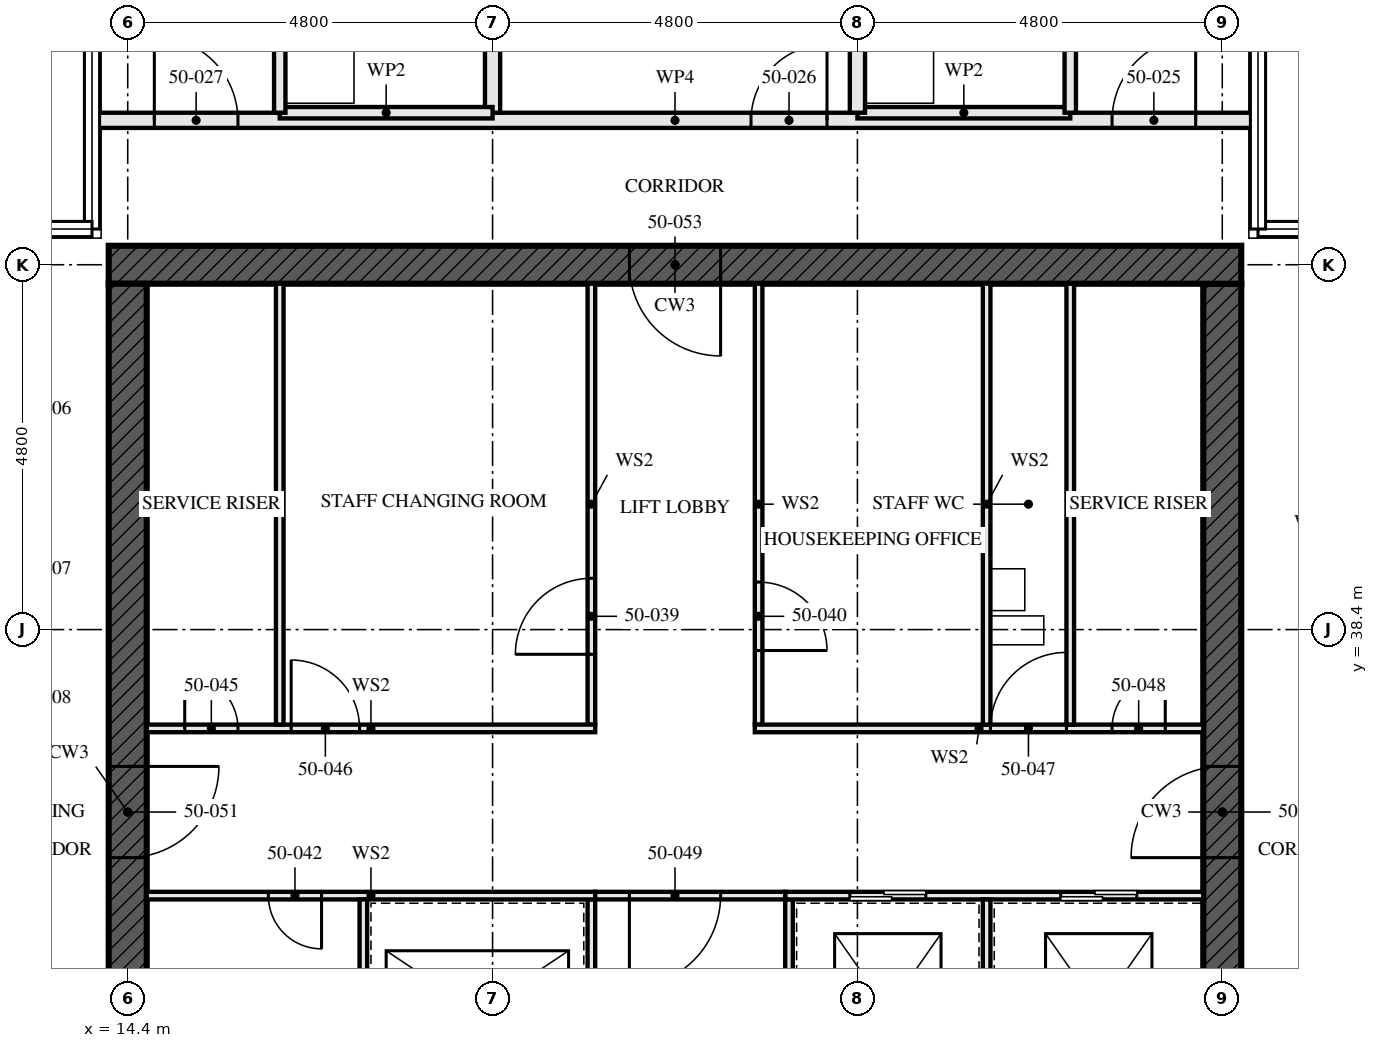
"""IFC4 building model, lengths in metres.
Left out: names, types, materials, properties, quantities, classifications, styles, units other than length and angle.
Written with IfcOpenShell. Run it as: python <this file> out.ifc"""

import sys

from ifc_helpers import new_model, si_unit, direction, frame, frame_2d, origin, place, context, subcontext, project, spatial, rectangle, extrude, element, fill, save


model = new_model("IFC4")
c1 = context("Model", 3, precision=1e-05, world=origin(), true_north=direction((0.0, 1.0)))
c2 = subcontext(c1, "Body", "Model", "MODEL_VIEW")
j1 = project(units=[si_unit("LENGTHUNIT", "METRE"), si_unit("PLANEANGLEUNIT", "RADIAN")], contexts=[c1])
p1 = place(None, origin())
s1 = spatial("IfcSite", under=j1, at=p1, CompositionType="ELEMENT")
p2 = place(p1, origin())
s2 = spatial("IfcBuilding", under=s1, at=p2, CompositionType="ELEMENT")
p3 = place(p2, frame((0.0, 0.0, 183.0)))
s3 = spatial("IfcBuildingStorey", under=s2, at=p3, CompositionType="ELEMENT", Elevation=183.0)
p4 = place(p3, frame((29.05, 43.2, -0.17), z_axis=(0.0, 0.0, 1.0), x_axis=(-1.0, 0.0, 0.0)))
e1 = element("IfcWall", 1, at=p4, inside=s3, PredefinedType="SHEAR", context=c2, shape_type="SweptSolid", body=[
    extrude(rectangle(XDim=14.9, YDim=0.5, at=frame_2d((7.45, 0.0))), origin(), (0.0, 0.0, 1.0), 3.5),
])
p5 = place(p4, frame((6.85, 0.0, 0.17)))
e2 = element("IfcOpeningElement", 2, at=p5, cuts=e1, PredefinedType="OPENING", context=c2, shape_type="SweptSolid", body=[
    extrude(rectangle(XDim=1.2, YDim=2.1, at=frame_2d((0.6, 1.05))), frame((0.0, 0.26, 0.0), z_axis=(0.0, -1.0, 0.0), x_axis=(1.0, 0.0, 0.0)), (0.0, 0.0, 1.0), 0.521),
])
p6 = place(p3, frame((14.4, 42.95, -0.17), z_axis=(0.0, 0.0, 1.0), x_axis=(0.0, -1.0, 0.0)))
e3 = element("IfcWall", 3, at=p6, inside=s3, PredefinedType="SHEAR", context=c2, shape_type="SweptSolid", body=[
    extrude(rectangle(XDim=13.9, YDim=0.5, at=frame_2d((6.95, 0.0))), origin(), (0.0, 0.0, 1.0), 3.5),
])
p7 = place(p6, frame((6.35, 0.0, 0.17)))
e4 = element("IfcOpeningElement", 4, at=p7, cuts=e3, PredefinedType="OPENING", context=c2, shape_type="SweptSolid", body=[
    extrude(rectangle(XDim=1.2, YDim=2.1, at=frame_2d((0.6, 1.05))), frame((0.0, 0.26, 0.0), z_axis=(0.0, -1.0, 0.0), x_axis=(1.0, 0.0, 0.0)), (0.0, 0.0, 1.0), 0.521),
])
p8 = place(p3, frame((28.8, 29.05, -0.17), z_axis=(0.0, 0.0, 1.0), x_axis=(0.0, 1.0, 0.0)))
e5 = element("IfcWall", 5, at=p8, inside=s3, PredefinedType="SHEAR", context=c2, shape_type="SweptSolid", body=[
    extrude(rectangle(XDim=13.9, YDim=0.5, at=frame_2d((6.95, 0.0))), origin(), (0.0, 0.0, 1.0), 3.5),
])
p9 = place(p8, frame((6.35, 0.0, 0.17)))
e6 = element("IfcOpeningElement", 6, at=p9, cuts=e5, PredefinedType="OPENING", context=c2, shape_type="SweptSolid", body=[
    extrude(rectangle(XDim=1.2, YDim=2.1, at=frame_2d((0.6, 1.05))), frame((0.0, 0.26, 0.0), z_axis=(0.0, -1.0, 0.0), x_axis=(1.0, 0.0, 0.0)), (0.0, 0.0, 1.0), 0.521),
])
p10 = place(p3, frame((26.8, 48.2, 0.0), z_axis=(0.0, 0.0, 1.0), x_axis=(0.0, -1.0, 0.0)))
e7 = element("IfcWall", 7, at=p10, inside=s3, PredefinedType="PARTITIONING", context=c2, shape_type="SweptSolid", body=[
    extrude(rectangle(XDim=3.0, YDim=0.15, at=frame_2d((1.5, 0.0))), origin(), (0.0, 0.0, 1.0), 2.55),
])
p11 = place(p3, frame((26.8, 45.2, 0.0), z_axis=(0.0, 0.0, 1.0), x_axis=(-1.0, 0.0, 0.0)))
e8 = element("IfcWall", 8, at=p11, inside=s3, PredefinedType="PARTITIONING", context=c2, shape_type="SweptSolid", body=[
    extrude(rectangle(XDim=2.8, YDim=0.15, at=frame_2d((1.4, 0.0))), origin(), (0.0, 0.0, 1.0), 3.33),
])
for number, where, z_axis, x_axis in (
    (9, (24.0, 52.48, 0.0), (0.0, 0.0, 1.0), (0.0, -1.0, 0.0)),
    (10, (19.2, 52.48, 0.0), (0.0, 0.0, 1.0), (0.0, -1.0, 0.0)),
):
    element("IfcWall", number, at=place(p3, frame(where, z_axis=z_axis, x_axis=x_axis)), inside=s3, PredefinedType="PARTITIONING", context=c2, shape_type="SweptSolid", body=[
        extrude(rectangle(XDim=7.28, YDim=0.2, at=frame_2d((3.64, 0.0))), origin(), (0.0, 0.0, 1.0), 2.55),
    ])
p12 = place(p3, frame((16.4, 48.2, 0.0), z_axis=(0.0, 0.0, 1.0), x_axis=(0.0, -1.0, 0.0)))
e11 = element("IfcWall", 11, at=p12, inside=s3, PredefinedType="PARTITIONING", context=c2, shape_type="SweptSolid", body=[
    extrude(rectangle(XDim=3.0, YDim=0.15, at=frame_2d((1.5, 0.0))), origin(), (0.0, 0.0, 1.0), 2.55),
])
p13 = place(p3, frame((19.2, 45.2, 0.0), z_axis=(0.0, 0.0, 1.0), x_axis=(-1.0, 0.0, 0.0)))
e12 = element("IfcWall", 12, at=p13, inside=s3, PredefinedType="PARTITIONING", context=c2, shape_type="SweptSolid", body=[
    extrude(rectangle(XDim=2.8, YDim=0.15, at=frame_2d((1.4, 0.0))), origin(), (0.0, 0.0, 1.0), 3.33),
])
p14 = place(p3, frame((29.25, 45.1, 0.0), z_axis=(0.0, 0.0, 1.0), x_axis=(-1.0, 0.0, 0.0)))
e13 = element("IfcWall", 13, at=p14, inside=s3, PredefinedType="PARTITIONING", context=c2, shape_type="SweptSolid", body=[
    extrude(rectangle(XDim=15.3, YDim=0.2, at=frame_2d((7.65, 0.0))), origin(), (0.0, 0.0, 1.0), 2.32),
])
p15 = place(p14, frame((0.8, 0.0, 0.0)))
e14 = element("IfcOpeningElement", 14, at=p15, cuts=e13, PredefinedType="OPENING", context=c2, shape_type="SweptSolid", body=[
    extrude(rectangle(XDim=1.1, YDim=2.1, at=frame_2d((0.55, 1.05))), frame((0.0, 0.111, 0.0), z_axis=(0.0, -1.0, 0.0), x_axis=(1.0, 0.0, 0.0)), (0.0, 0.0, 1.0), 0.221),
])
p16 = place(p14, frame((5.65, 0.0, 0.0)))
e15 = element("IfcOpeningElement", 15, at=p16, cuts=e13, PredefinedType="OPENING", context=c2, shape_type="SweptSolid", body=[
    extrude(rectangle(XDim=1.0, YDim=2.1, at=frame_2d((0.5, 1.05))), frame((0.0, 0.111, 0.0), z_axis=(0.0, -1.0, 0.0), x_axis=(1.0, 0.0, 0.0)), (0.0, 0.0, 1.0), 0.221),
])
p17 = place(p14, frame((13.4, 0.0, 0.0)))
e16 = element("IfcOpeningElement", 16, at=p17, cuts=e13, PredefinedType="OPENING", context=c2, shape_type="SweptSolid", body=[
    extrude(rectangle(XDim=1.1, YDim=2.1, at=frame_2d((0.55, 1.05))), frame((0.0, 0.111, 0.0), z_axis=(0.0, -1.0, 0.0), x_axis=(1.0, 0.0, 0.0)), (0.0, 0.0, 1.0), 0.221),
])
for number, where, z_axis, x_axis in (
    (17, (16.4, 37.15, 0.0), (0.0, 0.0, 1.0), (0.0, 1.0, 0.0)),
    (18, (26.8, 37.15, 0.0), (0.0, 0.0, 1.0), (0.0, 1.0, 0.0)),
):
    element("IfcWall", number, at=place(p3, frame(where, z_axis=z_axis, x_axis=x_axis)), inside=s3, PredefinedType="SOLIDWALL", context=c2, shape_type="SweptSolid", body=[
        extrude(rectangle(XDim=5.8, YDim=0.1, at=frame_2d((2.9, 0.0))), origin(), (0.0, 0.0, 1.0), 3.33),
    ])
p18 = place(p3, frame((20.5, 29.05, 0.0), z_axis=(0.0, 0.0, 1.0), x_axis=(0.0, 1.0, 0.0)))
e19 = element("IfcWall", 19, at=p18, inside=s3, PredefinedType="SOLIDWALL", context=c2, shape_type="SweptSolid", body=[
    extrude(rectangle(XDim=5.8, YDim=0.1, at=frame_2d((2.9, 0.0))), origin(), (0.0, 0.0, 1.0), 3.33),
])
p19 = place(p18, frame((0.8, 0.0, 0.0)))
e20 = element("IfcOpeningElement", 20, at=p19, cuts=e19, PredefinedType="OPENING", context=c2, shape_type="SweptSolid", body=[
    extrude(rectangle(XDim=1.1, YDim=2.3, at=frame_2d((0.55, 1.15))), frame((0.0, 0.061, 0.0), z_axis=(0.0, -1.0, 0.0), x_axis=(1.0, 0.0, 0.0)), (0.0, 0.0, 1.0), 0.121),
])
p20 = place(p18, frame((3.775, 0.0, 0.0)))
e21 = element("IfcOpeningElement", 21, at=p20, cuts=e19, PredefinedType="OPENING", context=c2, shape_type="SweptSolid", body=[
    extrude(rectangle(XDim=1.1, YDim=2.3, at=frame_2d((0.55, 1.15))), frame((0.0, 0.061, 0.0), z_axis=(0.0, -1.0, 0.0), x_axis=(1.0, 0.0, 0.0)), (0.0, 0.0, 1.0), 0.121),
])
p21 = place(p3, frame((20.5, 37.15, 0.0), z_axis=(0.0, 0.0, 1.0), x_axis=(0.0, 1.0, 0.0)))
e22 = element("IfcWall", 22, at=p21, inside=s3, PredefinedType="SOLIDWALL", context=c2, shape_type="SweptSolid", body=[
    extrude(rectangle(XDim=5.8, YDim=0.1, at=frame_2d((2.9, 0.0))), origin(), (0.0, 0.0, 1.0), 3.33),
])
p22 = place(p21, frame((0.925, 0.0, 0.0)))
e23 = element("IfcOpeningElement", 23, at=p22, cuts=e22, PredefinedType="OPENING", context=c2, shape_type="SweptSolid", body=[
    extrude(rectangle(XDim=1.0, YDim=2.1, at=frame_2d((0.5, 1.05))), frame((0.0, 0.061, 0.0), z_axis=(0.0, -1.0, 0.0), x_axis=(1.0, 0.0, 0.0)), (0.0, 0.0, 1.0), 0.121),
])
p23 = place(p3, frame((22.7, 37.15, 0.0), z_axis=(0.0, 0.0, 1.0), x_axis=(0.0, 1.0, 0.0)))
e24 = element("IfcWall", 24, at=p23, inside=s3, PredefinedType="SOLIDWALL", context=c2, shape_type="SweptSolid", body=[
    extrude(rectangle(XDim=5.8, YDim=0.1, at=frame_2d((2.9, 0.0))), origin(), (0.0, 0.0, 1.0), 3.33),
])
p24 = place(p23, frame((0.975, 0.0, 0.0)))
e25 = element("IfcOpeningElement", 25, at=p24, cuts=e24, PredefinedType="OPENING", context=c2, shape_type="SweptSolid", body=[
    extrude(rectangle(XDim=0.9, YDim=2.1, at=frame_2d((0.45, 1.05))), frame((0.0, 0.061, 0.0), z_axis=(0.0, -1.0, 0.0), x_axis=(1.0, 0.0, 0.0)), (0.0, 0.0, 1.0), 0.121),
])
p25 = place(p3, frame((23.1, 29.05, 0.0), z_axis=(0.0, 0.0, 1.0), x_axis=(0.0, 1.0, 0.0)))
e26 = element("IfcWall", 26, at=p25, inside=s3, PredefinedType="SOLIDWALL", context=c2, shape_type="SweptSolid", body=[
    extrude(rectangle(XDim=5.8, YDim=0.1, at=frame_2d((2.9, 0.0))), origin(), (0.0, 0.0, 1.0), 3.33),
])
p26 = place(p25, frame((1.0, 0.0, 0.0)))
e27 = element("IfcOpeningElement", 27, at=p26, cuts=e26, PredefinedType="OPENING", context=c2, shape_type="SweptSolid", body=[
    extrude(rectangle(XDim=0.7, YDim=2.1, at=frame_2d((0.35, 1.05))), frame((0.0, 0.061, 0.0), z_axis=(0.0, -1.0, 0.0), x_axis=(1.0, 0.0, 0.0)), (0.0, 0.0, 1.0), 0.121),
])
p27 = place(p3, frame((14.65, 34.9, 0.0), z_axis=(0.0, 0.0, 1.0), x_axis=(1.0, 0.0, 0.0)))
e28 = element("IfcWall", 28, at=p27, inside=s3, PredefinedType="SOLIDWALL", context=c2, shape_type="SweptSolid", body=[
    extrude(rectangle(XDim=5.9, YDim=0.1, at=frame_2d((2.95, 0.0))), origin(), (0.0, 0.0, 1.0), 3.33),
])
p28 = place(p27, frame((1.6, 0.0, 0.0)))
e29 = element("IfcOpeningElement", 29, at=p28, cuts=e28, PredefinedType="OPENING", context=c2, shape_type="SweptSolid", body=[
    extrude(rectangle(XDim=0.7, YDim=2.1, at=frame_2d((0.35, 1.05))), frame((0.0, 0.061, 0.0), z_axis=(0.0, -1.0, 0.0), x_axis=(1.0, 0.0, 0.0)), (0.0, 0.0, 1.0), 0.121),
])
p29 = place(p3, frame((23.05, 34.9, 0.0), z_axis=(0.0, 0.0, 1.0), x_axis=(1.0, 0.0, 0.0)))
e30 = element("IfcWall", 30, at=p29, inside=s3, PredefinedType="SOLIDWALL", context=c2, shape_type="SweptSolid", body=[
    extrude(rectangle(XDim=5.5, YDim=0.1, at=frame_2d((2.75, 0.0))), origin(), (0.0, 0.0, 1.0), 3.33),
])
p30 = place(p29, frame((0.85, 0.0, 0.0)))
e31 = element("IfcOpeningElement", 31, at=p30, cuts=e30, PredefinedType="OPENING", context=c2, shape_type="SweptSolid", body=[
    extrude(rectangle(XDim=1.0, YDim=2.1, at=frame_2d((0.5, 1.05))), frame((0.0, 0.061, 0.0), z_axis=(0.0, -1.0, 0.0), x_axis=(1.0, 0.0, 0.0)), (0.0, 0.0, 1.0), 0.121),
])
p31 = place(p29, frame((3.625, 0.0, 0.0)))
e32 = element("IfcOpeningElement", 32, at=p31, cuts=e30, PredefinedType="OPENING", context=c2, shape_type="SweptSolid", body=[
    extrude(rectangle(XDim=1.0, YDim=2.1, at=frame_2d((0.5, 1.05))), frame((0.0, 0.061, 0.0), z_axis=(0.0, -1.0, 0.0), x_axis=(1.0, 0.0, 0.0)), (0.0, 0.0, 1.0), 0.121),
])
p32 = place(p3, frame((14.65, 37.1, 0.0), z_axis=(0.0, 0.0, 1.0), x_axis=(1.0, 0.0, 0.0)))
e33 = element("IfcWall", 33, at=p32, inside=s3, PredefinedType="SOLIDWALL", context=c2, shape_type="SweptSolid", body=[
    extrude(rectangle(XDim=5.9, YDim=0.1, at=frame_2d((2.95, 0.0))), origin(), (0.0, 0.0, 1.0), 3.33),
])
p33 = place(p32, frame((0.5, 0.0, 0.0)))
e34 = element("IfcOpeningElement", 34, at=p33, cuts=e33, PredefinedType="OPENING", context=c2, shape_type="SweptSolid", body=[
    extrude(rectangle(XDim=0.7, YDim=2.1, at=frame_2d((0.35, 1.05))), frame((0.0, 0.061, 0.0), z_axis=(0.0, -1.0, 0.0), x_axis=(1.0, 0.0, 0.0)), (0.0, 0.0, 1.0), 0.121),
])
p34 = place(p32, frame((1.9, 0.0, 0.0)))
e35 = element("IfcOpeningElement", 35, at=p34, cuts=e33, PredefinedType="OPENING", context=c2, shape_type="SweptSolid", body=[
    extrude(rectangle(XDim=0.9, YDim=2.1, at=frame_2d((0.45, 1.05))), frame((0.0, 0.061, 0.0), z_axis=(0.0, -1.0, 0.0), x_axis=(1.0, 0.0, 0.0)), (0.0, 0.0, 1.0), 0.121),
])
p35 = place(p3, frame((22.65, 37.1, 0.0), z_axis=(0.0, 0.0, 1.0), x_axis=(1.0, 0.0, 0.0)))
e36 = element("IfcWall", 36, at=p35, inside=s3, PredefinedType="SOLIDWALL", context=c2, shape_type="SweptSolid", body=[
    extrude(rectangle(XDim=5.9, YDim=0.1, at=frame_2d((2.95, 0.0))), origin(), (0.0, 0.0, 1.0), 3.33),
])
p36 = place(p35, frame((3.1, 0.0, 0.0)))
e37 = element("IfcOpeningElement", 37, at=p36, cuts=e36, PredefinedType="OPENING", context=c2, shape_type="SweptSolid", body=[
    extrude(rectangle(XDim=1.0, YDim=2.1, at=frame_2d((0.5, 1.05))), frame((0.0, 0.061, 0.0), z_axis=(0.0, -1.0, 0.0), x_axis=(1.0, 0.0, 0.0)), (0.0, 0.0, 1.0), 0.121),
])
p37 = place(p35, frame((4.7, 0.0, 0.0)))
e38 = element("IfcOpeningElement", 38, at=p37, cuts=e36, PredefinedType="OPENING", context=c2, shape_type="SweptSolid", body=[
    extrude(rectangle(XDim=0.7, YDim=2.1, at=frame_2d((0.35, 1.05))), frame((0.0, 0.061, 0.0), z_axis=(0.0, -1.0, 0.0), x_axis=(1.0, 0.0, 0.0)), (0.0, 0.0, 1.0), 0.121),
])
p38 = place(p3, frame((20.55, 34.9, 0.0), z_axis=(0.0, 0.0, 1.0), x_axis=(1.0, 0.0, 0.0)))
e39 = element("IfcWall", 39, at=p38, inside=s3, PredefinedType="SOLIDWALL", context=c2, shape_type="SweptSolid", body=[
    extrude(rectangle(XDim=2.5, YDim=0.1, at=frame_2d((1.25, 0.0))), origin(), (0.0, 0.0, 1.0), 3.33),
])
p39 = place(p38, frame((0.45, 0.0, 0.0)))
e40 = element("IfcOpeningElement", 40, at=p39, cuts=e39, PredefinedType="OPENING", context=c2, shape_type="SweptSolid", body=[
    extrude(rectangle(XDim=1.2, YDim=2.1, at=frame_2d((0.6, 1.05))), frame((0.0, 0.061, 0.0), z_axis=(0.0, -1.0, 0.0), x_axis=(1.0, 0.0, 0.0)), (0.0, 0.0, 1.0), 0.121),
])
for number, where, z_axis, x_axis in (
    (41, (17.5, 29.05, 0.0), (0.0, 0.0, 1.0), (0.0, 1.0, 0.0)),
    (42, (25.7, 37.15, 0.0), (0.0, 0.0, 1.0), (0.0, 1.0, 0.0)),
):
    element("IfcWall", number, at=place(p3, frame(where, z_axis=z_axis, x_axis=x_axis)), inside=s3, PredefinedType="SOLIDWALL", context=c2, shape_type="SweptSolid", body=[
        extrude(rectangle(XDim=5.8, YDim=0.1, at=frame_2d((2.9, 0.0))), origin(), (0.0, 0.0, 1.0), 3.33),
    ])
p40 = place(p3, frame((25.7, 31.95, 0.0), z_axis=(0.0, 0.0, 1.0), x_axis=(0.0, 1.0, 0.0)))
e43 = element("IfcWall", 43, at=p40, inside=s3, PredefinedType="SOLIDWALL", context=c2, shape_type="SweptSolid", body=[
    extrude(rectangle(XDim=2.9, YDim=0.1, at=frame_2d((1.45, 0.0))), origin(), (0.0, 0.0, 1.0), 3.33),
])
p41 = place(p15, frame((1.1, 0.0, 0.0), z_axis=(0.0, 0.0, 1.0), x_axis=(-1.0, 0.0, 0.0)))
e44 = element("IfcDoor", 44, at=p41, inside=s3, OperationType="SINGLE_SWING_LEFT", PredefinedType="DOOR", context=c2, shape_type="SweptSolid", body=[
    extrude(rectangle(XDim=1.1, YDim=2.1, at=frame_2d((0.55, 1.05))), frame((0.0, 0.027, 0.0), z_axis=(0.0, -1.0, 0.0), x_axis=(1.0, 0.0, 0.0)), (0.0, 0.0, 1.0), 0.054),
])
fill(e14, e44)
p42 = place(p16, frame((1.0, 0.0, 0.0), z_axis=(0.0, 0.0, 1.0), x_axis=(-1.0, 0.0, 0.0)))
e45 = element("IfcDoor", 45, at=p42, inside=s3, OperationType="SINGLE_SWING_LEFT", PredefinedType="DOOR", context=c2, shape_type="SweptSolid", body=[
    extrude(rectangle(XDim=1.0, YDim=2.1, at=frame_2d((0.5, 1.05))), frame((0.0, 0.027, 0.0), z_axis=(0.0, -1.0, 0.0), x_axis=(1.0, 0.0, 0.0)), (0.0, 0.0, 1.0), 0.054),
])
fill(e15, e45)
p43 = place(p17, frame((1.1, 0.0, 0.0), z_axis=(0.0, 0.0, 1.0), x_axis=(-1.0, 0.0, 0.0)))
e46 = element("IfcDoor", 46, at=p43, inside=s3, OperationType="SINGLE_SWING_RIGHT", PredefinedType="DOOR", context=c2, shape_type="SweptSolid", body=[
    extrude(rectangle(XDim=1.1, YDim=2.1, at=frame_2d((0.55, 1.05))), frame((0.0, 0.027, 0.0), z_axis=(0.0, -1.0, 0.0), x_axis=(1.0, 0.0, 0.0)), (0.0, 0.0, 1.0), 0.054),
])
fill(e16, e46)
p44 = place(p22, origin())
e47 = element("IfcDoor", 47, at=p44, inside=s3, OperationType="SINGLE_SWING_RIGHT", PredefinedType="DOOR", context=c2, shape_type="SweptSolid", body=[
    extrude(rectangle(XDim=1.0, YDim=2.1, at=frame_2d((0.5, 1.05))), frame((0.0, 0.027, 0.0), z_axis=(0.0, -1.0, 0.0), x_axis=(1.0, 0.0, 0.0)), (0.0, 0.0, 1.0), 0.054),
])
fill(e23, e47)
p45 = place(p24, frame((0.9, 0.0, 0.0), z_axis=(0.0, 0.0, 1.0), x_axis=(-1.0, 0.0, 0.0)))
e48 = element("IfcDoor", 48, at=p45, inside=s3, OperationType="SINGLE_SWING_LEFT", PredefinedType="DOOR", context=c2, shape_type="SweptSolid", body=[
    extrude(rectangle(XDim=0.9, YDim=2.1, at=frame_2d((0.45, 1.05))), frame((0.0, 0.027, 0.0), z_axis=(0.0, -1.0, 0.0), x_axis=(1.0, 0.0, 0.0)), (0.0, 0.0, 1.0), 0.054),
])
fill(e25, e48)
p46 = place(p28, frame((0.7, 0.0, 0.0), z_axis=(0.0, 0.0, 1.0), x_axis=(-1.0, 0.0, 0.0)))
e49 = element("IfcDoor", 49, at=p46, inside=s3, OperationType="SINGLE_SWING_RIGHT", PredefinedType="DOOR", context=c2, shape_type="SweptSolid", body=[
    extrude(rectangle(XDim=0.7, YDim=2.1, at=frame_2d((0.35, 1.05))), frame((0.0, 0.027, 0.0), z_axis=(0.0, -1.0, 0.0), x_axis=(1.0, 0.0, 0.0)), (0.0, 0.0, 1.0), 0.054),
])
fill(e29, e49)
p47 = place(p30, origin())
e50 = element("IfcDoor", 50, at=p47, inside=s3, OperationType="SLIDING_TO_LEFT", PredefinedType="DOOR", context=c2, shape_type="SweptSolid", body=[
    extrude(rectangle(XDim=1.0, YDim=2.1, at=frame_2d((0.5, 1.05))), frame((0.0, 0.05, 0.0), z_axis=(0.0, -1.0, 0.0), x_axis=(1.0, 0.0, 0.0)), (0.0, 0.0, 1.0), 0.1),
])
fill(e31, e50)
p48 = place(p31, origin())
e51 = element("IfcDoor", 51, at=p48, inside=s3, OperationType="SLIDING_TO_LEFT", PredefinedType="DOOR", context=c2, shape_type="SweptSolid", body=[
    extrude(rectangle(XDim=1.0, YDim=2.1, at=frame_2d((0.5, 1.05))), frame((0.0, 0.05, 0.0), z_axis=(0.0, -1.0, 0.0), x_axis=(1.0, 0.0, 0.0)), (0.0, 0.0, 1.0), 0.1),
])
fill(e32, e51)
p49 = place(p33, origin())
e52 = element("IfcDoor", 52, at=p49, inside=s3, OperationType="SINGLE_SWING_RIGHT", PredefinedType="DOOR", context=c2, shape_type="SweptSolid", body=[
    extrude(rectangle(XDim=0.7, YDim=2.1, at=frame_2d((0.35, 1.05))), frame((0.0, 0.027, 0.0), z_axis=(0.0, -1.0, 0.0), x_axis=(1.0, 0.0, 0.0)), (0.0, 0.0, 1.0), 0.054),
])
fill(e34, e52)
p50 = place(p34, origin())
e53 = element("IfcDoor", 53, at=p50, inside=s3, OperationType="SINGLE_SWING_RIGHT", PredefinedType="DOOR", context=c2, shape_type="SweptSolid", body=[
    extrude(rectangle(XDim=0.9, YDim=2.1, at=frame_2d((0.45, 1.05))), frame((0.0, 0.027, 0.0), z_axis=(0.0, -1.0, 0.0), x_axis=(1.0, 0.0, 0.0)), (0.0, 0.0, 1.0), 0.054),
])
fill(e35, e53)
p51 = place(p36, origin())
e54 = element("IfcDoor", 54, at=p51, inside=s3, OperationType="SINGLE_SWING_LEFT", PredefinedType="DOOR", context=c2, shape_type="SweptSolid", body=[
    extrude(rectangle(XDim=1.0, YDim=2.1, at=frame_2d((0.5, 1.05))), frame((0.0, 0.027, 0.0), z_axis=(0.0, -1.0, 0.0), x_axis=(1.0, 0.0, 0.0)), (0.0, 0.0, 1.0), 0.054),
])
fill(e37, e54)
p52 = place(p37, origin())
e55 = element("IfcDoor", 55, at=p52, inside=s3, OperationType="SINGLE_SWING_LEFT", PredefinedType="DOOR", context=c2, shape_type="SweptSolid", body=[
    extrude(rectangle(XDim=0.7, YDim=2.1, at=frame_2d((0.35, 1.05))), frame((0.0, 0.027, 0.0), z_axis=(0.0, -1.0, 0.0), x_axis=(1.0, 0.0, 0.0)), (0.0, 0.0, 1.0), 0.054),
])
fill(e38, e55)
p53 = place(p39, frame((1.2, 0.0, 0.0), z_axis=(0.0, 0.0, 1.0), x_axis=(-1.0, 0.0, 0.0)))
e56 = element("IfcDoor", 56, at=p53, inside=s3, OperationType="SINGLE_SWING_LEFT", PredefinedType="DOOR", context=c2, shape_type="SweptSolid", body=[
    extrude(rectangle(XDim=1.2, YDim=2.1, at=frame_2d((0.6, 1.05))), frame((0.0, 0.027, 0.0), z_axis=(0.0, -1.0, 0.0), x_axis=(1.0, 0.0, 0.0)), (0.0, 0.0, 1.0), 0.054),
])
fill(e40, e56)
p54 = place(p7, origin())
e57 = element("IfcDoor", 57, at=p54, inside=s3, OperationType="SINGLE_SWING_LEFT", PredefinedType="DOOR", context=c2, shape_type="SweptSolid", body=[
    extrude(rectangle(XDim=1.2, YDim=2.1, at=frame_2d((0.6, 1.05))), frame((0.0, 0.027, 0.0), z_axis=(0.0, -1.0, 0.0), x_axis=(1.0, 0.0, 0.0)), (0.0, 0.0, 1.0), 0.054),
])
fill(e4, e57)
p55 = place(p9, origin())
e58 = element("IfcDoor", 58, at=p55, inside=s3, OperationType="SINGLE_SWING_LEFT", PredefinedType="DOOR", context=c2, shape_type="SweptSolid", body=[
    extrude(rectangle(XDim=1.2, YDim=2.1, at=frame_2d((0.6, 1.05))), frame((0.0, 0.027, 0.0), z_axis=(0.0, -1.0, 0.0), x_axis=(1.0, 0.0, 0.0)), (0.0, 0.0, 1.0), 0.054),
])
fill(e6, e58)
p56 = place(p5, origin())
e59 = element("IfcDoor", 59, at=p56, inside=s3, OperationType="SINGLE_SWING_LEFT", PredefinedType="DOOR", context=c2, shape_type="SweptSolid", body=[
    extrude(rectangle(XDim=1.2, YDim=2.1, at=frame_2d((0.6, 1.05))), frame((0.0, 0.027, 0.0), z_axis=(0.0, -1.0, 0.0), x_axis=(1.0, 0.0, 0.0)), (0.0, 0.0, 1.0), 0.054),
])
fill(e2, e59)
save(model, sys.argv[1])
